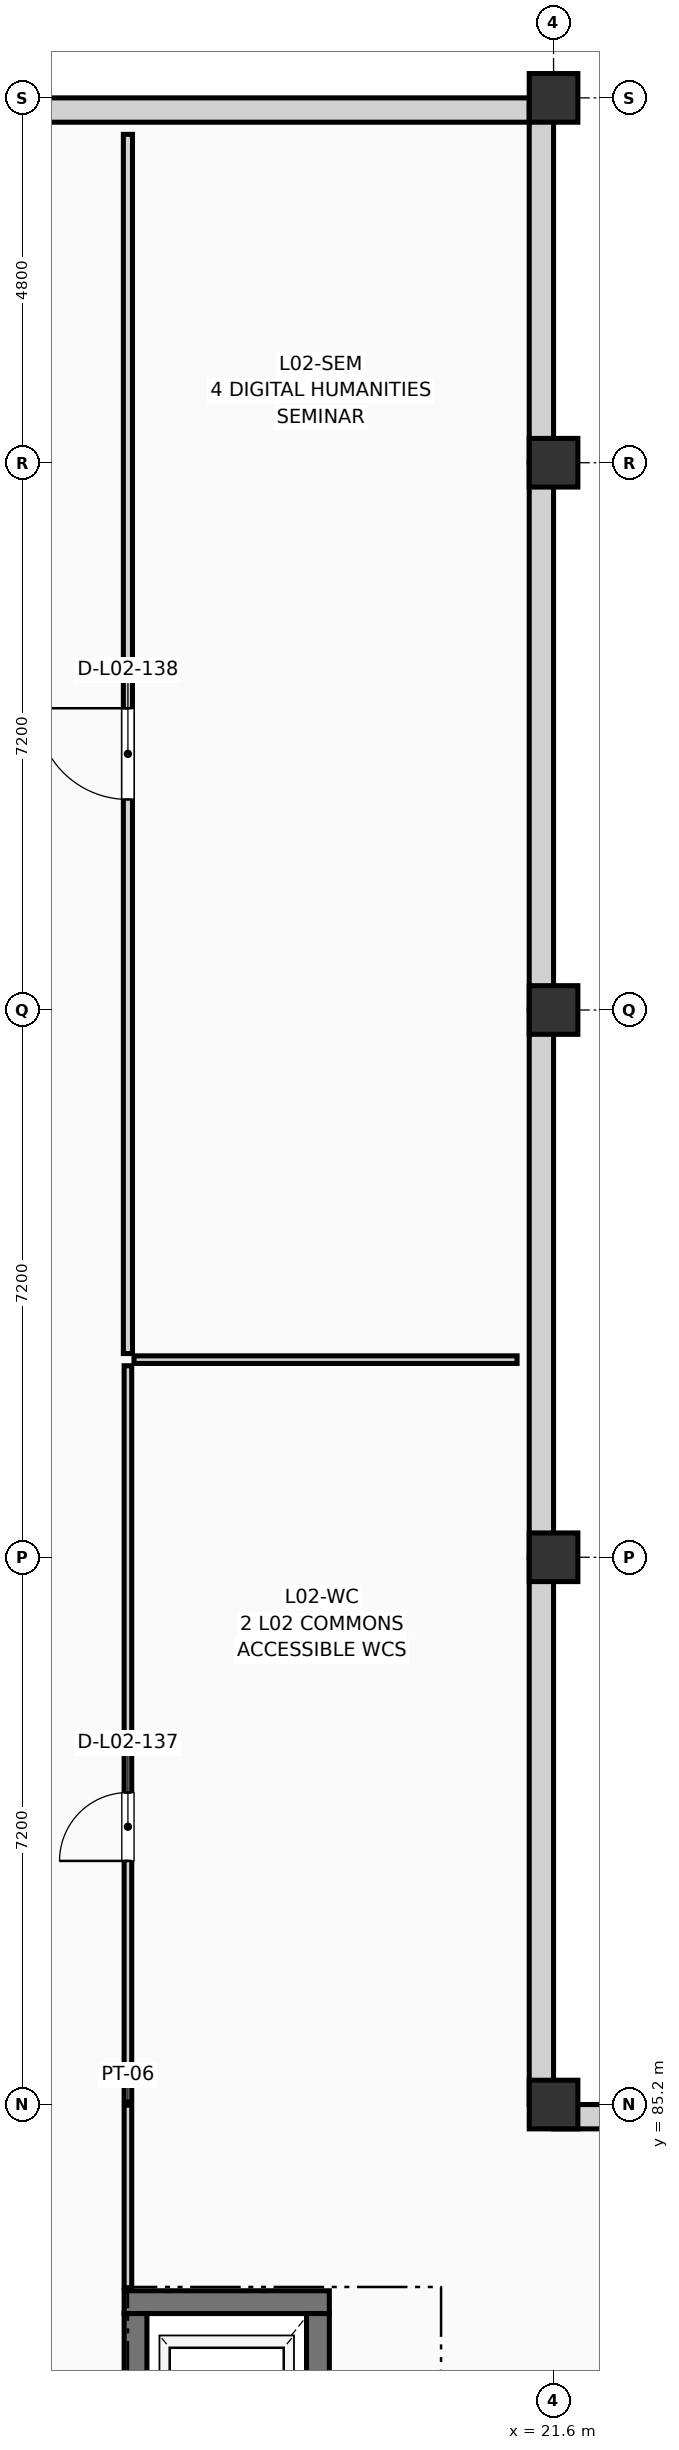
"""IFC4 building model, lengths in metres.
Left out: names, types, materials, properties, quantities, classifications, styles, units other than length and angle.
Written with IfcOpenShell. Run it as: python <this file> out.ifc"""

import sys

from ifc_helpers import new_model, si_unit, direction, frame, frame_2d, origin, origin_2d, place, context, subcontext, project, spatial, rectangle, extrude, element, fill, save


model = new_model("IFC4")
c1 = context("Model", 3, precision=1e-05, world=origin(), true_north=direction((0.0, 1.0)))
c2 = subcontext(c1, "Body", "Model", "MODEL_VIEW")
j1 = project(units=[si_unit("LENGTHUNIT", "METRE"), si_unit("PLANEANGLEUNIT", "RADIAN")], contexts=[c1])
p1 = place(None, origin())
s1 = spatial("IfcSite", under=j1, at=p1, CompositionType="ELEMENT")
p2 = place(p1, origin())
s2 = spatial("IfcBuilding", under=s1, at=p2, CompositionType="ELEMENT")
p3 = place(p2, frame((0.0, 0.0, 8.55)))
s3 = spatial("IfcBuildingStorey", under=s2, at=p3, CompositionType="ELEMENT", Elevation=8.55)
for number, where, z_axis, x_axis in (
    (1, (21.6, 85.2, 0.0), (0.0, 0.0, 1.0), (1.0, 0.0, 0.0)),
    (2, (21.6, 92.4, 0.0), (0.0, 0.0, 1.0), (1.0, 0.0, 0.0)),
    (3, (21.6, 99.6, 0.0), (0.0, 0.0, 1.0), (1.0, 0.0, 0.0)),
    (4, (21.6, 106.8, 0.0), (0.0, 0.0, 1.0), (1.0, 0.0, 0.0)),
    (5, (21.6, 111.6, 0.0), (0.0, 0.0, 1.0), (1.0, 0.0, 0.0)),
):
    element("IfcColumn", number, at=place(p3, frame(where, z_axis=z_axis, x_axis=x_axis)), inside=s3, PredefinedType="COLUMN", context=c2, shape_type="SweptSolid", body=[
        extrude(rectangle(XDim=0.64, YDim=0.64, at=origin_2d()), origin(), (0.0, 0.0, 1.0), 3.6),
    ])
p4 = place(p3, frame((14.4, 111.44, 0.0), z_axis=(0.0, 0.0, 1.0), x_axis=(1.0, 0.0, 0.0)))
e6 = element("IfcWall", 6, at=p4, inside=s3, PredefinedType="SOLIDWALL", context=c2, shape_type="SweptSolid", body=[
    extrude(rectangle(XDim=7.2, YDim=0.32, at=frame_2d((3.6, 0.0))), origin(), (0.0, 0.0, 1.0), 2.84),
])
p5 = place(p3, frame((21.44, 106.8, 0.0), z_axis=(0.0, 0.0, 1.0), x_axis=(0.0, 1.0, 0.0)))
e7 = element("IfcWall", 7, at=p5, inside=s3, PredefinedType="SOLIDWALL", context=c2, shape_type="SweptSolid", body=[
    extrude(rectangle(XDim=4.8, YDim=0.32, at=frame_2d((2.4, 0.0))), origin(), (0.0, 0.0, 1.0), 2.84),
])
p6 = place(p3, frame((21.44, 99.6, 0.0), z_axis=(0.0, 0.0, 1.0), x_axis=(0.0, 1.0, 0.0)))
e8 = element("IfcWall", 8, at=p6, inside=s3, PredefinedType="SOLIDWALL", context=c2, shape_type="SweptSolid", body=[
    extrude(rectangle(XDim=7.2, YDim=0.32, at=frame_2d((3.6, 0.0))), origin(), (0.0, 0.0, 1.0), 2.84),
])
p7 = place(p3, frame((21.44, 92.4, 0.0), z_axis=(0.0, 0.0, 1.0), x_axis=(0.0, 1.0, 0.0)))
e9 = element("IfcWall", 9, at=p7, inside=s3, PredefinedType="SOLIDWALL", context=c2, shape_type="SweptSolid", body=[
    extrude(rectangle(XDim=7.2, YDim=0.32, at=frame_2d((3.6, 0.0))), origin(), (0.0, 0.0, 1.0), 2.84),
])
for number, where, z_axis, x_axis in (
    (10, (21.44, 85.2, 0.0), (0.0, 0.0, 1.0), (0.0, 1.0, 0.0)),
    (11, (21.6, 85.04, 0.0), (0.0, 0.0, 1.0), (1.0, 0.0, 0.0)),
):
    element("IfcWall", number, at=place(p3, frame(where, z_axis=z_axis, x_axis=x_axis)), inside=s3, PredefinedType="SOLIDWALL", context=c2, shape_type="SweptSolid", body=[
        extrude(rectangle(XDim=7.2, YDim=0.32, at=frame_2d((3.6, 0.0))), origin(), (0.0, 0.0, 1.0), 2.84),
    ])
p8 = place(p3, frame((15.95, 82.6, 0.0), z_axis=(0.0, 0.0, 1.0), x_axis=(1.0, 0.0, 0.0)))
e12 = element("IfcWall", 12, at=p8, inside=s3, PredefinedType="SHEAR", context=c2, shape_type="SweptSolid", body=[
    extrude(rectangle(XDim=2.7, YDim=0.3, at=frame_2d((1.35, 0.0))), origin(), (0.0, 0.0, 1.0), 3.39),
])
p9 = place(p3, frame((16.1, 79.78, 0.0), z_axis=(0.0, 0.0, 1.0), x_axis=(0.0, 1.0, 0.0)))
e13 = element("IfcWall", 13, at=p9, inside=s3, PredefinedType="SHEAR", context=c2, shape_type="SweptSolid", body=[
    extrude(rectangle(XDim=2.67, YDim=0.3, at=frame_2d((1.335, 0.0))), origin(), (0.0, 0.0, 1.0), 3.39),
])
p10 = place(p9, frame((0.785, 0.0, 0.0)))
e14 = element("IfcOpeningElement", 14, at=p10, cuts=e13, PredefinedType="OPENING", context=c2, shape_type="SweptSolid", body=[
    extrude(rectangle(XDim=1.1, YDim=2.2, at=frame_2d((0.55, 1.1))), frame((0.0, 0.162, 0.0), z_axis=(0.0, -1.0, 0.0), x_axis=(1.0, 0.0, 0.0)), (0.0, 0.0, 1.0), 0.324),
])
p11 = place(p3, frame((18.5, 79.78, 0.0), z_axis=(0.0, 0.0, 1.0), x_axis=(0.0, 1.0, 0.0)))
e15 = element("IfcWall", 15, at=p11, inside=s3, PredefinedType="SHEAR", context=c2, shape_type="SweptSolid", body=[
    extrude(rectangle(XDim=2.67, YDim=0.3, at=frame_2d((1.335, 0.0))), origin(), (0.0, 0.0, 1.0), 3.39),
])
p12 = place(p3, frame((16.0, 82.79, 0.0), z_axis=(0.0, 0.0, 1.0), x_axis=(0.0, 1.0, 0.0)))
e16 = element("IfcWall", 16, at=p12, inside=s3, PredefinedType="PARTITIONING", context=c2, shape_type="SweptSolid", body=[
    extrude(rectangle(XDim=12.13, YDim=0.1, at=frame_2d((6.065, 0.0))), origin(), (0.0, 0.0, 1.0), 3.375),
])
p13 = place(p12, frame((5.615, 0.0, 0.0)))
e17 = element("IfcOpeningElement", 17, at=p13, cuts=e16, PredefinedType="OPENING", context=c2, shape_type="SweptSolid", body=[
    extrude(rectangle(XDim=0.9, YDim=2.1, at=frame_2d((0.45, 1.05))), frame((0.0, 0.062, 0.0), z_axis=(0.0, -1.0, 0.0), x_axis=(1.0, 0.0, 0.0)), (0.0, 0.0, 1.0), 0.124),
])
p14 = place(p3, frame((16.08, 95.0, 0.0), z_axis=(0.0, 0.0, 1.0), x_axis=(1.0, 0.0, 0.0)))
e18 = element("IfcWall", 18, at=p14, inside=s3, PredefinedType="PARTITIONING", context=c2, shape_type="SweptSolid", body=[
    extrude(rectangle(XDim=5.04, YDim=0.1, at=frame_2d((2.52, 0.0))), origin(), (0.0, 0.0, 1.0), 3.375),
])
p15 = place(p3, frame((16.0, 95.08, 0.0), z_axis=(0.0, 0.0, 1.0), x_axis=(0.0, 1.0, 0.0)))
e19 = element("IfcWall", 19, at=p15, inside=s3, PredefinedType="PARTITIONING", context=c2, shape_type="SweptSolid", body=[
    extrude(rectangle(XDim=16.04, YDim=0.12, at=frame_2d((8.02, 0.0))), origin(), (0.0, 0.0, 1.0), 3.375),
])
p16 = place(p15, frame((7.29, 0.0, 0.0)))
e20 = element("IfcOpeningElement", 20, at=p16, cuts=e19, PredefinedType="OPENING", context=c2, shape_type="SweptSolid", body=[
    extrude(rectangle(XDim=1.2, YDim=2.15, at=frame_2d((0.6, 1.075))), frame((0.0, 0.072, 0.0), z_axis=(0.0, -1.0, 0.0), x_axis=(1.0, 0.0, 0.0)), (0.0, 0.0, 1.0), 0.144),
])
p17 = place(p13, origin())
e21 = element("IfcDoor", 21, at=p17, inside=s3, OperationType="SINGLE_SWING_LEFT", PredefinedType="DOOR", context=c2, shape_type="SweptSolid", body=[
    extrude(rectangle(XDim=0.9, YDim=2.1, at=frame_2d((0.45, 1.05))), frame((0.0, 0.025, 0.0), z_axis=(0.0, -1.0, 0.0), x_axis=(1.0, 0.0, 0.0)), (0.0, 0.0, 1.0), 0.05),
])
fill(e17, e21)
p18 = place(p16, origin())
e22 = element("IfcDoor", 22, at=p18, inside=s3, OperationType="SINGLE_SWING_RIGHT", PredefinedType="DOOR", context=c2, shape_type="SweptSolid", body=[
    extrude(rectangle(XDim=1.2, YDim=2.15, at=frame_2d((0.6, 1.075))), frame((0.0, 0.025, 0.0), z_axis=(0.0, -1.0, 0.0), x_axis=(1.0, 0.0, 0.0)), (0.0, 0.0, 1.0), 0.05),
])
fill(e20, e22)
save(model, sys.argv[1])
